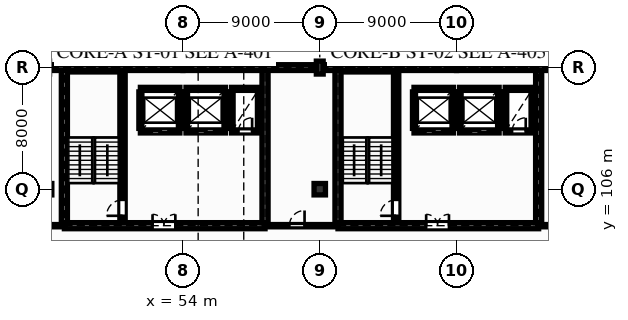
"""IFC4 building model, lengths in metres.
Left out: names, types, materials, properties, quantities, classifications, styles, units other than length and angle.
Written with IfcOpenShell. Run it as: python <this file> out.ifc"""

import sys

from ifc_helpers import new_model, si_unit, direction, frame, frame_2d, origin, origin_2d, place, context, subcontext, project, spatial, rectangle, extrude, element, fill, save


model = new_model("IFC4")
c1 = context("Model", 3, precision=1e-05, world=origin(), true_north=direction((0.0, 1.0)))
c2 = subcontext(c1, "Body", "Model", "MODEL_VIEW")
j1 = project(units=[si_unit("LENGTHUNIT", "METRE"), si_unit("PLANEANGLEUNIT", "RADIAN")], contexts=[c1])
p1 = place(None, origin())
s1 = spatial("IfcSite", under=j1, at=p1, CompositionType="ELEMENT")
p2 = place(p1, origin())
s2 = spatial("IfcBuilding", under=s1, at=p2, CompositionType="ELEMENT")
p3 = place(p2, frame((0.0, 0.0, 8.94)))
s3 = spatial("IfcBuildingStorey", under=s2, at=p3, CompositionType="ELEMENT", Elevation=8.94)
p4 = place(p3, frame((45.0, 114.0, 0.0), z_axis=(0.0, 0.0, 1.0), x_axis=(0.0, 1.0, 0.0)))
e1 = element("IfcColumn", 1, at=p4, inside=s3, PredefinedType="COLUMN", context=c2, shape_type="SweptSolid", body=[
    extrude(rectangle(XDim=0.45, YDim=0.85, at=origin_2d()), origin(), (0.0, 0.0, 1.0), 3.84),
])
p5 = place(p3, frame((63.0, 106.0, 0.0), z_axis=(0.0, 0.0, 1.0), x_axis=(1.0, 0.0, 0.0)))
e2 = element("IfcColumn", 2, at=p5, inside=s3, PredefinedType="COLUMN", context=c2, shape_type="SweptSolid", body=[
    extrude(rectangle(XDim=0.75, YDim=0.75, at=origin_2d()), origin(), (0.0, 0.0, 1.0), 3.84),
])
p6 = place(p3, frame((63.0, 114.0, 0.0), z_axis=(0.0, 0.0, 1.0), x_axis=(0.0, 1.0, 0.0)))
e3 = element("IfcColumn", 3, at=p6, inside=s3, PredefinedType="COLUMN", context=c2, shape_type="SweptSolid", body=[
    extrude(rectangle(XDim=0.45, YDim=0.85, at=origin_2d()), origin(), (0.0, 0.0, 1.0), 3.84),
])
for number, where, z_axis, x_axis in (
    (4, (45.0, 114.0, 0.0), (0.0, 0.0, 1.0), (1.0, 0.0, 0.0)),
    (5, (54.0, 114.0, 0.0), (0.0, 0.0, 1.0), (1.0, 0.0, 0.0)),
    (6, (63.0, 114.0, 0.0), (0.0, 0.0, 1.0), (1.0, 0.0, 0.0)),
    (7, (72.0, 114.0, 0.0), (0.0, 0.0, 1.0), (1.0, 0.0, 0.0)),
):
    element("IfcWall", number, at=place(p3, frame(where, z_axis=z_axis, x_axis=x_axis)), inside=s3, PredefinedType="SOLIDWALL", context=c2, shape_type="SweptSolid", body=[
        extrude(rectangle(XDim=9.0, YDim=0.38, at=frame_2d((4.5, 0.0))), origin(), (0.0, 0.0, 1.0), 3.53),
    ])
p7 = place(p3, frame((46.2, 103.6, 0.0), z_axis=(0.0, 0.0, 1.0), x_axis=(1.0, 0.0, 0.0)))
e8 = element("IfcWall", 8, at=p7, inside=s3, PredefinedType="SHEAR", context=c2, shape_type="SweptSolid", body=[
    extrude(rectangle(XDim=13.2, YDim=0.4, at=frame_2d((6.6, 0.0))), origin(), (0.0, 0.0, 1.0), 3.53),
])
p8 = place(p7, frame((5.8, 0.0, 0.0)))
e9 = element("IfcOpeningElement", 9, at=p8, cuts=e8, PredefinedType="OPENING", context=c2, shape_type="SweptSolid", body=[
    extrude(rectangle(XDim=1.5, YDim=2.2, at=frame_2d((0.75, 1.1))), frame((0.0, 0.21, 0.0), z_axis=(0.0, -1.0, 0.0), x_axis=(1.0, 0.0, 0.0)), (0.0, 0.0, 1.0), 0.42),
])
for number, where, z_axis, x_axis in (
    (10, (46.2, 103.8, 0.0), (0.0, 0.0, 1.0), (0.0, 1.0, 0.0)),
    (11, (59.4, 103.8, 0.0), (0.0, 0.0, 1.0), (0.0, 1.0, 0.0)),
):
    element("IfcWall", number, at=place(p3, frame(where, z_axis=z_axis, x_axis=x_axis)), inside=s3, PredefinedType="SHEAR", context=c2, shape_type="SweptSolid", body=[
        extrude(rectangle(XDim=10.01, YDim=0.4, at=frame_2d((5.005, 0.0))), origin(), (0.0, 0.0, 1.0), 3.53),
    ])
p9 = place(p3, frame((50.025, 103.8, 0.0), z_axis=(0.0, 0.0, 1.0), x_axis=(0.0, 1.0, 0.0)))
e12 = element("IfcWall", 12, at=p9, inside=s3, PredefinedType="SHEAR", context=c2, shape_type="SweptSolid", body=[
    extrude(rectangle(XDim=10.01, YDim=0.35, at=frame_2d((5.005, 0.0))), origin(), (0.0, 0.0, 1.0), 3.53),
])
p10 = place(p9, frame((0.45, 0.0, 0.0)))
e13 = element("IfcOpeningElement", 13, at=p10, cuts=e12, PredefinedType="OPENING", context=c2, shape_type="SweptSolid", body=[
    extrude(rectangle(XDim=1.05, YDim=2.2, at=frame_2d((0.525, 1.1))), frame((0.0, 0.185, 0.0), z_axis=(0.0, -1.0, 0.0), x_axis=(1.0, 0.0, 0.0)), (0.0, 0.0, 1.0), 0.37),
])
p11 = place(p3, frame((51.2, 109.8, 0.0), z_axis=(0.0, 0.0, 1.0), x_axis=(1.0, 0.0, 0.0)))
e14 = element("IfcWall", 14, at=p11, inside=s3, PredefinedType="PARTITIONING", context=c2, shape_type="SweptSolid", body=[
    extrude(rectangle(XDim=2.6, YDim=0.2, at=frame_2d((1.3, 0.0))), origin(), (0.0, 0.0, 1.0), 3.53),
])
p12 = place(p11, frame((0.75, 0.0, 0.0)))
e15 = element("IfcOpeningElement", 15, at=p12, cuts=e14, PredefinedType="OPENING", context=c2, shape_type="SweptSolid", body=[
    extrude(rectangle(XDim=1.1, YDim=2.15, at=frame_2d((0.55, 1.075))), frame((0.0, 0.11, 0.0), z_axis=(0.0, -1.0, 0.0), x_axis=(1.0, 0.0, 0.0)), (0.0, 0.0, 1.0), 0.22),
])
p13 = place(p3, frame((51.2, 112.6, 0.0), z_axis=(0.0, 0.0, 1.0), x_axis=(1.0, 0.0, 0.0)))
e16 = element("IfcWall", 16, at=p13, inside=s3, PredefinedType="PARTITIONING", context=c2, shape_type="SweptSolid", body=[
    extrude(rectangle(XDim=2.6, YDim=0.2, at=frame_2d((1.3, 0.0))), origin(), (0.0, 0.0, 1.0), 3.53),
])
for number, where, z_axis, x_axis in (
    (17, (51.2, 110.0, 0.0), (0.0, 0.0, 1.0), (0.0, 1.0, 0.0)),
    (18, (53.8, 110.0, 0.0), (0.0, 0.0, 1.0), (0.0, 1.0, 0.0)),
):
    element("IfcWall", number, at=place(p3, frame(where, z_axis=z_axis, x_axis=x_axis)), inside=s3, PredefinedType="PARTITIONING", context=c2, shape_type="SweptSolid", body=[
        extrude(rectangle(XDim=2.4, YDim=0.2, at=frame_2d((1.2, 0.0))), origin(), (0.0, 0.0, 1.0), 3.53),
    ])
p14 = place(p3, frame((54.2, 109.8, 0.0), z_axis=(0.0, 0.0, 1.0), x_axis=(1.0, 0.0, 0.0)))
e19 = element("IfcWall", 19, at=p14, inside=s3, PredefinedType="PARTITIONING", context=c2, shape_type="SweptSolid", body=[
    extrude(rectangle(XDim=2.6, YDim=0.2, at=frame_2d((1.3, 0.0))), origin(), (0.0, 0.0, 1.0), 3.53),
])
p15 = place(p14, frame((0.75, 0.0, 0.0)))
e20 = element("IfcOpeningElement", 20, at=p15, cuts=e19, PredefinedType="OPENING", context=c2, shape_type="SweptSolid", body=[
    extrude(rectangle(XDim=1.1, YDim=2.15, at=frame_2d((0.55, 1.075))), frame((0.0, 0.11, 0.0), z_axis=(0.0, -1.0, 0.0), x_axis=(1.0, 0.0, 0.0)), (0.0, 0.0, 1.0), 0.22),
])
p16 = place(p3, frame((54.2, 112.6, 0.0), z_axis=(0.0, 0.0, 1.0), x_axis=(1.0, 0.0, 0.0)))
e21 = element("IfcWall", 21, at=p16, inside=s3, PredefinedType="PARTITIONING", context=c2, shape_type="SweptSolid", body=[
    extrude(rectangle(XDim=2.6, YDim=0.2, at=frame_2d((1.3, 0.0))), origin(), (0.0, 0.0, 1.0), 3.53),
])
for number, where, z_axis, x_axis in (
    (22, (54.2, 110.0, 0.0), (0.0, 0.0, 1.0), (0.0, 1.0, 0.0)),
    (23, (56.8, 110.0, 0.0), (0.0, 0.0, 1.0), (0.0, 1.0, 0.0)),
):
    element("IfcWall", number, at=place(p3, frame(where, z_axis=z_axis, x_axis=x_axis)), inside=s3, PredefinedType="PARTITIONING", context=c2, shape_type="SweptSolid", body=[
        extrude(rectangle(XDim=2.4, YDim=0.2, at=frame_2d((1.2, 0.0))), origin(), (0.0, 0.0, 1.0), 3.53),
    ])
p17 = place(p3, frame((57.2, 109.8, 0.0), z_axis=(0.0, 0.0, 1.0), x_axis=(1.0, 0.0, 0.0)))
e24 = element("IfcWall", 24, at=p17, inside=s3, PredefinedType="PARTITIONING", context=c2, shape_type="SweptSolid", body=[
    extrude(rectangle(XDim=1.8, YDim=0.2, at=frame_2d((0.9, 0.0))), origin(), (0.0, 0.0, 1.0), 3.53),
])
p18 = place(p17, frame((0.45, 0.0, 0.0)))
e25 = element("IfcOpeningElement", 25, at=p18, cuts=e24, PredefinedType="OPENING", context=c2, shape_type="SweptSolid", body=[
    extrude(rectangle(XDim=0.9, YDim=2.1, at=frame_2d((0.45, 1.05))), frame((0.0, 0.11, 0.0), z_axis=(0.0, -1.0, 0.0), x_axis=(1.0, 0.0, 0.0)), (0.0, 0.0, 1.0), 0.22),
])
p19 = place(p3, frame((57.2, 112.6, 0.0), z_axis=(0.0, 0.0, 1.0), x_axis=(1.0, 0.0, 0.0)))
e26 = element("IfcWall", 26, at=p19, inside=s3, PredefinedType="PARTITIONING", context=c2, shape_type="SweptSolid", body=[
    extrude(rectangle(XDim=1.8, YDim=0.2, at=frame_2d((0.9, 0.0))), origin(), (0.0, 0.0, 1.0), 3.53),
])
for number, where, z_axis, x_axis in (
    (27, (57.2, 110.0, 0.0), (0.0, 0.0, 1.0), (0.0, 1.0, 0.0)),
    (28, (59.0, 110.0, 0.0), (0.0, 0.0, 1.0), (0.0, 1.0, 0.0)),
):
    element("IfcWall", number, at=place(p3, frame(where, z_axis=z_axis, x_axis=x_axis)), inside=s3, PredefinedType="PARTITIONING", context=c2, shape_type="SweptSolid", body=[
        extrude(rectangle(XDim=2.4, YDim=0.2, at=frame_2d((1.2, 0.0))), origin(), (0.0, 0.0, 1.0), 3.53),
    ])
p20 = place(p3, frame((64.2, 103.6, 0.0), z_axis=(0.0, 0.0, 1.0), x_axis=(1.0, 0.0, 0.0)))
e29 = element("IfcWall", 29, at=p20, inside=s3, PredefinedType="SHEAR", context=c2, shape_type="SweptSolid", body=[
    extrude(rectangle(XDim=13.2, YDim=0.4, at=frame_2d((6.6, 0.0))), origin(), (0.0, 0.0, 1.0), 3.53),
])
p21 = place(p20, frame((5.8, 0.0, 0.0)))
e30 = element("IfcOpeningElement", 30, at=p21, cuts=e29, PredefinedType="OPENING", context=c2, shape_type="SweptSolid", body=[
    extrude(rectangle(XDim=1.5, YDim=2.2, at=frame_2d((0.75, 1.1))), frame((0.0, 0.21, 0.0), z_axis=(0.0, -1.0, 0.0), x_axis=(1.0, 0.0, 0.0)), (0.0, 0.0, 1.0), 0.42),
])
for number, where, z_axis, x_axis in (
    (31, (64.2, 103.8, 0.0), (0.0, 0.0, 1.0), (0.0, 1.0, 0.0)),
    (32, (77.4, 103.8, 0.0), (0.0, 0.0, 1.0), (0.0, 1.0, 0.0)),
):
    element("IfcWall", number, at=place(p3, frame(where, z_axis=z_axis, x_axis=x_axis)), inside=s3, PredefinedType="SHEAR", context=c2, shape_type="SweptSolid", body=[
        extrude(rectangle(XDim=10.01, YDim=0.4, at=frame_2d((5.005, 0.0))), origin(), (0.0, 0.0, 1.0), 3.53),
    ])
p22 = place(p3, frame((68.025, 103.8, 0.0), z_axis=(0.0, 0.0, 1.0), x_axis=(0.0, 1.0, 0.0)))
e33 = element("IfcWall", 33, at=p22, inside=s3, PredefinedType="SHEAR", context=c2, shape_type="SweptSolid", body=[
    extrude(rectangle(XDim=10.01, YDim=0.35, at=frame_2d((5.005, 0.0))), origin(), (0.0, 0.0, 1.0), 3.53),
])
p23 = place(p22, frame((0.45, 0.0, 0.0)))
e34 = element("IfcOpeningElement", 34, at=p23, cuts=e33, PredefinedType="OPENING", context=c2, shape_type="SweptSolid", body=[
    extrude(rectangle(XDim=1.05, YDim=2.2, at=frame_2d((0.525, 1.1))), frame((0.0, 0.185, 0.0), z_axis=(0.0, -1.0, 0.0), x_axis=(1.0, 0.0, 0.0)), (0.0, 0.0, 1.0), 0.37),
])
p24 = place(p3, frame((69.2, 109.8, 0.0), z_axis=(0.0, 0.0, 1.0), x_axis=(1.0, 0.0, 0.0)))
e35 = element("IfcWall", 35, at=p24, inside=s3, PredefinedType="PARTITIONING", context=c2, shape_type="SweptSolid", body=[
    extrude(rectangle(XDim=2.6, YDim=0.2, at=frame_2d((1.3, 0.0))), origin(), (0.0, 0.0, 1.0), 3.53),
])
p25 = place(p24, frame((0.75, 0.0, 0.0)))
e36 = element("IfcOpeningElement", 36, at=p25, cuts=e35, PredefinedType="OPENING", context=c2, shape_type="SweptSolid", body=[
    extrude(rectangle(XDim=1.1, YDim=2.15, at=frame_2d((0.55, 1.075))), frame((0.0, 0.11, 0.0), z_axis=(0.0, -1.0, 0.0), x_axis=(1.0, 0.0, 0.0)), (0.0, 0.0, 1.0), 0.22),
])
p26 = place(p3, frame((69.2, 112.6, 0.0), z_axis=(0.0, 0.0, 1.0), x_axis=(1.0, 0.0, 0.0)))
e37 = element("IfcWall", 37, at=p26, inside=s3, PredefinedType="PARTITIONING", context=c2, shape_type="SweptSolid", body=[
    extrude(rectangle(XDim=2.6, YDim=0.2, at=frame_2d((1.3, 0.0))), origin(), (0.0, 0.0, 1.0), 3.53),
])
for number, where, z_axis, x_axis in (
    (38, (69.2, 110.0, 0.0), (0.0, 0.0, 1.0), (0.0, 1.0, 0.0)),
    (39, (71.8, 110.0, 0.0), (0.0, 0.0, 1.0), (0.0, 1.0, 0.0)),
):
    element("IfcWall", number, at=place(p3, frame(where, z_axis=z_axis, x_axis=x_axis)), inside=s3, PredefinedType="PARTITIONING", context=c2, shape_type="SweptSolid", body=[
        extrude(rectangle(XDim=2.4, YDim=0.2, at=frame_2d((1.2, 0.0))), origin(), (0.0, 0.0, 1.0), 3.53),
    ])
p27 = place(p3, frame((72.2, 109.8, 0.0), z_axis=(0.0, 0.0, 1.0), x_axis=(1.0, 0.0, 0.0)))
e40 = element("IfcWall", 40, at=p27, inside=s3, PredefinedType="PARTITIONING", context=c2, shape_type="SweptSolid", body=[
    extrude(rectangle(XDim=2.6, YDim=0.2, at=frame_2d((1.3, 0.0))), origin(), (0.0, 0.0, 1.0), 3.53),
])
p28 = place(p27, frame((0.75, 0.0, 0.0)))
e41 = element("IfcOpeningElement", 41, at=p28, cuts=e40, PredefinedType="OPENING", context=c2, shape_type="SweptSolid", body=[
    extrude(rectangle(XDim=1.1, YDim=2.15, at=frame_2d((0.55, 1.075))), frame((0.0, 0.11, 0.0), z_axis=(0.0, -1.0, 0.0), x_axis=(1.0, 0.0, 0.0)), (0.0, 0.0, 1.0), 0.22),
])
p29 = place(p3, frame((72.2, 112.6, 0.0), z_axis=(0.0, 0.0, 1.0), x_axis=(1.0, 0.0, 0.0)))
e42 = element("IfcWall", 42, at=p29, inside=s3, PredefinedType="PARTITIONING", context=c2, shape_type="SweptSolid", body=[
    extrude(rectangle(XDim=2.6, YDim=0.2, at=frame_2d((1.3, 0.0))), origin(), (0.0, 0.0, 1.0), 3.53),
])
for number, where, z_axis, x_axis in (
    (43, (72.2, 110.0, 0.0), (0.0, 0.0, 1.0), (0.0, 1.0, 0.0)),
    (44, (74.8, 110.0, 0.0), (0.0, 0.0, 1.0), (0.0, 1.0, 0.0)),
):
    element("IfcWall", number, at=place(p3, frame(where, z_axis=z_axis, x_axis=x_axis)), inside=s3, PredefinedType="PARTITIONING", context=c2, shape_type="SweptSolid", body=[
        extrude(rectangle(XDim=2.4, YDim=0.2, at=frame_2d((1.2, 0.0))), origin(), (0.0, 0.0, 1.0), 3.53),
    ])
p30 = place(p3, frame((75.2, 109.8, 0.0), z_axis=(0.0, 0.0, 1.0), x_axis=(1.0, 0.0, 0.0)))
e45 = element("IfcWall", 45, at=p30, inside=s3, PredefinedType="PARTITIONING", context=c2, shape_type="SweptSolid", body=[
    extrude(rectangle(XDim=1.8, YDim=0.2, at=frame_2d((0.9, 0.0))), origin(), (0.0, 0.0, 1.0), 3.53),
])
p31 = place(p30, frame((0.45, 0.0, 0.0)))
e46 = element("IfcOpeningElement", 46, at=p31, cuts=e45, PredefinedType="OPENING", context=c2, shape_type="SweptSolid", body=[
    extrude(rectangle(XDim=0.9, YDim=2.1, at=frame_2d((0.45, 1.05))), frame((0.0, 0.11, 0.0), z_axis=(0.0, -1.0, 0.0), x_axis=(1.0, 0.0, 0.0)), (0.0, 0.0, 1.0), 0.22),
])
p32 = place(p3, frame((75.2, 112.6, 0.0), z_axis=(0.0, 0.0, 1.0), x_axis=(1.0, 0.0, 0.0)))
e47 = element("IfcWall", 47, at=p32, inside=s3, PredefinedType="PARTITIONING", context=c2, shape_type="SweptSolid", body=[
    extrude(rectangle(XDim=1.8, YDim=0.2, at=frame_2d((0.9, 0.0))), origin(), (0.0, 0.0, 1.0), 3.53),
])
for number, where, z_axis, x_axis in (
    (48, (75.2, 110.0, 0.0), (0.0, 0.0, 1.0), (0.0, 1.0, 0.0)),
    (49, (77.0, 110.0, 0.0), (0.0, 0.0, 1.0), (0.0, 1.0, 0.0)),
):
    element("IfcWall", number, at=place(p3, frame(where, z_axis=z_axis, x_axis=x_axis)), inside=s3, PredefinedType="PARTITIONING", context=c2, shape_type="SweptSolid", body=[
        extrude(rectangle(XDim=2.4, YDim=0.2, at=frame_2d((1.2, 0.0))), origin(), (0.0, 0.0, 1.0), 3.53),
    ])
p33 = place(p3, frame((36.0, 103.6, 0.0), z_axis=(0.0, 0.0, 1.0), x_axis=(1.0, 0.0, 0.0)))
e50 = element("IfcWall", 50, at=p33, inside=s3, PredefinedType="PARTITIONING", context=c2, shape_type="SweptSolid", body=[
    extrude(rectangle(XDim=10.2, YDim=0.15, at=frame_2d((5.1, 0.0))), origin(), (0.0, 0.0, 1.0), 3.53),
])
p34 = place(p33, frame((4.4, 0.0, 0.0)))
e51 = element("IfcOpeningElement", 51, at=p34, cuts=e50, PredefinedType="OPENING", context=c2, shape_type="SweptSolid", body=[
    extrude(rectangle(XDim=1.0, YDim=2.15, at=frame_2d((0.5, 1.075))), frame((0.0, 0.085, 0.0), z_axis=(0.0, -1.0, 0.0), x_axis=(1.0, 0.0, 0.0)), (0.0, 0.0, 1.0), 0.17),
])
p35 = place(p3, frame((59.4, 103.6, 0.0), z_axis=(0.0, 0.0, 1.0), x_axis=(1.0, 0.0, 0.0)))
e52 = element("IfcWall", 52, at=p35, inside=s3, PredefinedType="PARTITIONING", context=c2, shape_type="SweptSolid", body=[
    extrude(rectangle(XDim=4.8, YDim=0.15, at=frame_2d((2.4, 0.0))), origin(), (0.0, 0.0, 1.0), 3.53),
])
p36 = place(p35, frame((1.6, 0.0, 0.0)))
e53 = element("IfcOpeningElement", 53, at=p36, cuts=e52, PredefinedType="OPENING", context=c2, shape_type="SweptSolid", body=[
    extrude(rectangle(XDim=1.0, YDim=2.15, at=frame_2d((0.5, 1.075))), frame((0.0, 0.085, 0.0), z_axis=(0.0, -1.0, 0.0), x_axis=(1.0, 0.0, 0.0)), (0.0, 0.0, 1.0), 0.17),
])
p37 = place(p3, frame((77.4, 103.6, 0.0), z_axis=(0.0, 0.0, 1.0), x_axis=(1.0, 0.0, 0.0)))
e54 = element("IfcWall", 54, at=p37, inside=s3, PredefinedType="PARTITIONING", context=c2, shape_type="SweptSolid", body=[
    extrude(rectangle(XDim=21.6, YDim=0.15, at=frame_2d((10.8, 0.0))), origin(), (0.0, 0.0, 1.0), 3.53),
])
p38 = place(p37, frame((10.1, 0.0, 0.0)))
e55 = element("IfcOpeningElement", 55, at=p38, cuts=e54, PredefinedType="OPENING", context=c2, shape_type="SweptSolid", body=[
    extrude(rectangle(XDim=1.0, YDim=2.15, at=frame_2d((0.5, 1.075))), frame((0.0, 0.085, 0.0), z_axis=(0.0, -1.0, 0.0), x_axis=(1.0, 0.0, 0.0)), (0.0, 0.0, 1.0), 0.17),
])
p39 = place(p8, origin())
e56 = element("IfcDoor", 56, at=p39, inside=s3, OperationType="DOUBLE_DOOR_SINGLE_SWING", PredefinedType="DOOR", context=c2, shape_type="SweptSolid", body=[
    extrude(rectangle(XDim=1.5, YDim=2.2, at=frame_2d((0.75, 1.1))), frame((0.0, 0.025, 0.0), z_axis=(0.0, -1.0, 0.0), x_axis=(1.0, 0.0, 0.0)), (0.0, 0.0, 1.0), 0.05),
])
fill(e9, e56)
p40 = place(p10, origin())
e57 = element("IfcDoor", 57, at=p40, inside=s3, OperationType="SINGLE_SWING_LEFT", PredefinedType="DOOR", context=c2, shape_type="SweptSolid", body=[
    extrude(rectangle(XDim=1.05, YDim=2.2, at=frame_2d((0.525, 1.1))), frame((0.0, 0.025, 0.0), z_axis=(0.0, -1.0, 0.0), x_axis=(1.0, 0.0, 0.0)), (0.0, 0.0, 1.0), 0.05),
])
fill(e13, e57)
p41 = place(p12, origin())
e58 = element("IfcDoor", 58, at=p41, inside=s3, OperationType="SLIDING_TO_LEFT", PredefinedType="DOOR", context=c2, shape_type="SweptSolid", body=[
    extrude(rectangle(XDim=1.1, YDim=2.15, at=frame_2d((0.55, 1.075))), frame((0.0, 0.025, 0.0), z_axis=(0.0, -1.0, 0.0), x_axis=(1.0, 0.0, 0.0)), (0.0, 0.0, 1.0), 0.05),
])
fill(e15, e58)
p42 = place(p15, origin())
e59 = element("IfcDoor", 59, at=p42, inside=s3, OperationType="SLIDING_TO_RIGHT", PredefinedType="DOOR", context=c2, shape_type="SweptSolid", body=[
    extrude(rectangle(XDim=1.1, YDim=2.15, at=frame_2d((0.55, 1.075))), frame((0.0, 0.025, 0.0), z_axis=(0.0, -1.0, 0.0), x_axis=(1.0, 0.0, 0.0)), (0.0, 0.0, 1.0), 0.05),
])
fill(e20, e59)
p43 = place(p18, origin())
e60 = element("IfcDoor", 60, at=p43, inside=s3, OperationType="SINGLE_SWING_RIGHT", PredefinedType="DOOR", context=c2, shape_type="SweptSolid", body=[
    extrude(rectangle(XDim=0.9, YDim=2.1, at=frame_2d((0.45, 1.05))), frame((0.0, 0.025, 0.0), z_axis=(0.0, -1.0, 0.0), x_axis=(1.0, 0.0, 0.0)), (0.0, 0.0, 1.0), 0.05),
])
fill(e25, e60)
p44 = place(p21, origin())
e61 = element("IfcDoor", 61, at=p44, inside=s3, OperationType="DOUBLE_DOOR_SINGLE_SWING", PredefinedType="DOOR", context=c2, shape_type="SweptSolid", body=[
    extrude(rectangle(XDim=1.5, YDim=2.2, at=frame_2d((0.75, 1.1))), frame((0.0, 0.025, 0.0), z_axis=(0.0, -1.0, 0.0), x_axis=(1.0, 0.0, 0.0)), (0.0, 0.0, 1.0), 0.05),
])
fill(e30, e61)
p45 = place(p23, origin())
e62 = element("IfcDoor", 62, at=p45, inside=s3, OperationType="SINGLE_SWING_LEFT", PredefinedType="DOOR", context=c2, shape_type="SweptSolid", body=[
    extrude(rectangle(XDim=1.05, YDim=2.2, at=frame_2d((0.525, 1.1))), frame((0.0, 0.025, 0.0), z_axis=(0.0, -1.0, 0.0), x_axis=(1.0, 0.0, 0.0)), (0.0, 0.0, 1.0), 0.05),
])
fill(e34, e62)
p46 = place(p25, origin())
e63 = element("IfcDoor", 63, at=p46, inside=s3, OperationType="SLIDING_TO_LEFT", PredefinedType="DOOR", context=c2, shape_type="SweptSolid", body=[
    extrude(rectangle(XDim=1.1, YDim=2.15, at=frame_2d((0.55, 1.075))), frame((0.0, 0.025, 0.0), z_axis=(0.0, -1.0, 0.0), x_axis=(1.0, 0.0, 0.0)), (0.0, 0.0, 1.0), 0.05),
])
fill(e36, e63)
p47 = place(p28, origin())
e64 = element("IfcDoor", 64, at=p47, inside=s3, OperationType="SLIDING_TO_RIGHT", PredefinedType="DOOR", context=c2, shape_type="SweptSolid", body=[
    extrude(rectangle(XDim=1.1, YDim=2.15, at=frame_2d((0.55, 1.075))), frame((0.0, 0.025, 0.0), z_axis=(0.0, -1.0, 0.0), x_axis=(1.0, 0.0, 0.0)), (0.0, 0.0, 1.0), 0.05),
])
fill(e41, e64)
p48 = place(p31, origin())
e65 = element("IfcDoor", 65, at=p48, inside=s3, OperationType="SINGLE_SWING_RIGHT", PredefinedType="DOOR", context=c2, shape_type="SweptSolid", body=[
    extrude(rectangle(XDim=0.9, YDim=2.1, at=frame_2d((0.45, 1.05))), frame((0.0, 0.025, 0.0), z_axis=(0.0, -1.0, 0.0), x_axis=(1.0, 0.0, 0.0)), (0.0, 0.0, 1.0), 0.05),
])
fill(e46, e65)
p49 = place(p36, origin())
e66 = element("IfcDoor", 66, at=p49, inside=s3, OperationType="SINGLE_SWING_RIGHT", PredefinedType="DOOR", context=c2, shape_type="SweptSolid", body=[
    extrude(rectangle(XDim=1.0, YDim=2.15, at=frame_2d((0.5, 1.075))), frame((0.0, 0.025, 0.0), z_axis=(0.0, -1.0, 0.0), x_axis=(1.0, 0.0, 0.0)), (0.0, 0.0, 1.0), 0.05),
])
fill(e53, e66)
save(model, sys.argv[1])
